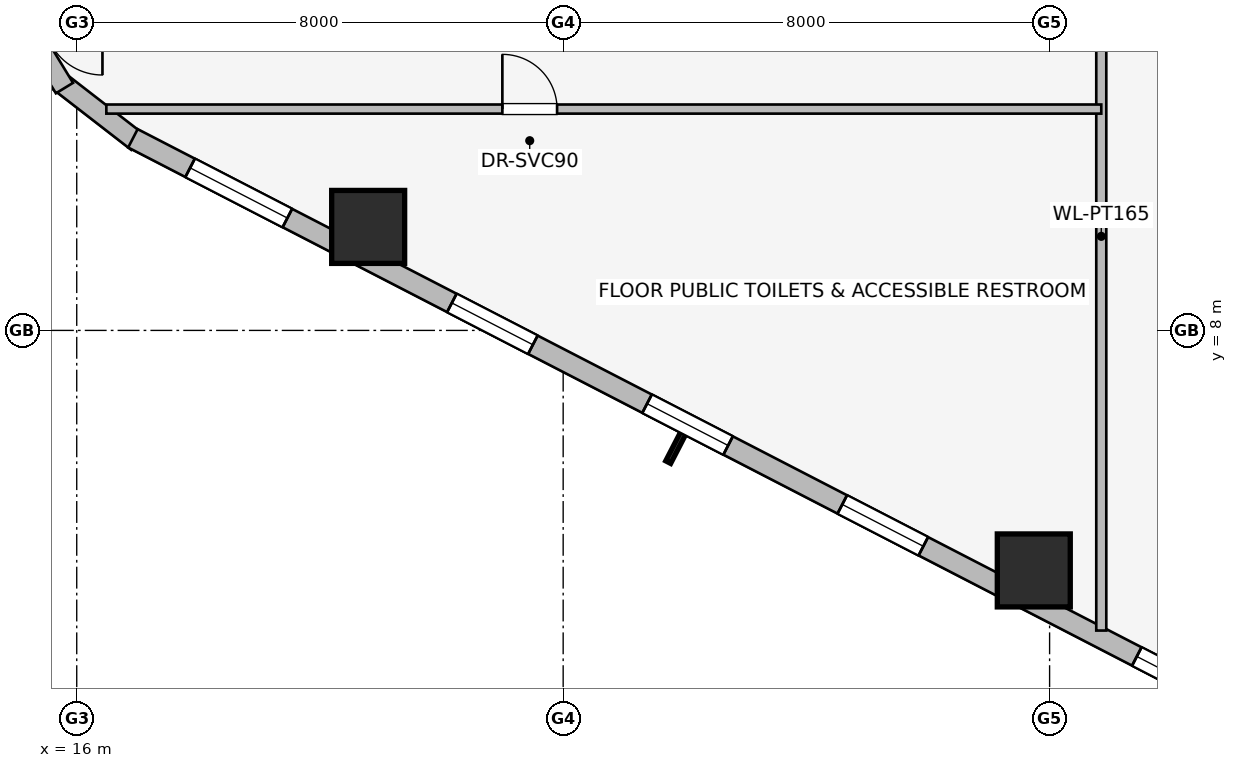
"""IFC4 building model, lengths in metres.
Left out: names, types, materials, properties, quantities, classifications, styles, units other than length and angle.
Written with IfcOpenShell. Run it as: python <this file> out.ifc"""

import sys

from ifc_helpers import new_model, si_unit, direction, frame, frame_2d, origin, origin_2d, place, context, subcontext, project, spatial, rectangle, extrude, element, fill, save


model = new_model("IFC4")
c1 = context("Model", 3, precision=1e-05, world=origin(), true_north=direction((0.0, 1.0)))
c2 = subcontext(c1, "Body", "Model", "MODEL_VIEW")
j1 = project(units=[si_unit("LENGTHUNIT", "METRE"), si_unit("PLANEANGLEUNIT", "RADIAN")], contexts=[c1])
p1 = place(None, origin())
s1 = spatial("IfcSite", under=j1, at=p1, CompositionType="ELEMENT")
p2 = place(p1, origin())
s2 = spatial("IfcBuilding", under=s1, at=p2, CompositionType="ELEMENT")
p3 = place(p2, frame((0.0, 0.0, 59.85)))
s3 = spatial("IfcBuildingStorey", under=s2, at=p3, CompositionType="ELEMENT", Elevation=59.85)
for number, where, z_axis, x_axis in (
    (1, (20.793, 9.702, 0.0), (0.0, 0.0, 1.0), (1.0, 0.0, 0.0)),
    (2, (31.74, 4.053, 0.0), (0.0, 0.0, 1.0), (1.0, 0.0, 0.0)),
):
    element("IfcColumn", number, at=place(p3, frame(where, z_axis=z_axis, x_axis=x_axis)), inside=s3, PredefinedType="COLUMN", context=c2, shape_type="SweptSolid", body=[
        extrude(rectangle(XDim=1.2, YDim=1.2, at=origin_2d()), origin(), (0.0, 0.0, 1.0), 3.65),
    ])
p4 = place(p3, frame((16.998, 11.099, 0.0), z_axis=(0.0, 0.0, 1.0), x_axis=(-0.790691856293, 0.61221433207, 0.0)))
e3 = element("IfcWall", 3, at=p4, inside=s3, PredefinedType="STANDARD", context=c2, shape_type="SweptSolid", body=[
    extrude(rectangle(XDim=1.676, YDim=0.33, at=frame_2d((0.838, 0.0))), origin(), (0.0, 0.0, 1.0), 3.39),
])
p5 = place(p3, frame((15.798, 11.985, 0.0), z_axis=(0.0, 0.0, 1.0), x_axis=(-0.520584129191, 0.853810379671, 0.0)))
e4 = element("IfcWall", 4, at=p5, inside=s3, PredefinedType="STANDARD", context=c2, shape_type="SweptSolid", body=[
    extrude(rectangle(XDim=1.677, YDim=0.33, at=frame_2d((0.838, 0.0))), origin(), (0.0, 0.0, 1.0), 3.39),
])
p6 = place(p3, frame((35.169, 1.743, 0.0), z_axis=(0.0, 0.0, 1.0), x_axis=(-0.888634413993, 0.458616264721, 0.0)))
e5 = element("IfcWall", 5, at=p6, inside=s3, PredefinedType="STANDARD", context=c2, shape_type="SweptSolid", body=[
    extrude(rectangle(XDim=20.531, YDim=0.34, at=frame_2d((10.266, 0.0))), origin(), (0.0, 0.0, 1.0), 2.684),
])
p7 = place(p6, frame((0.902, 0.0, 0.75)))
e6 = element("IfcOpeningElement", 6, at=p7, cuts=e5, PredefinedType="OPENING", context=c2, shape_type="SweptSolid", body=[
    extrude(rectangle(XDim=1.05, YDim=1.4, at=frame_2d((0.525, 0.7))), frame((0.0, 0.18, 0.0), z_axis=(0.0, -1.0, 0.0), x_axis=(1.0, 0.0, 0.0)), (0.0, 0.0, 1.0), 0.36),
])
p8 = place(p6, frame((5.903, 0.0, 0.75)))
e7 = element("IfcOpeningElement", 7, at=p8, cuts=e5, PredefinedType="OPENING", context=c2, shape_type="SweptSolid", body=[
    extrude(rectangle(XDim=1.5, YDim=1.5, at=frame_2d((0.75, 0.75))), frame((0.0, 0.18, 0.0), z_axis=(0.0, -1.0, 0.0), x_axis=(1.0, 0.0, 0.0)), (0.0, 0.0, 1.0), 0.36),
])
p9 = place(p6, frame((9.516, 0.0, 0.75)))
e8 = element("IfcOpeningElement", 8, at=p9, cuts=e5, PredefinedType="OPENING", context=c2, shape_type="SweptSolid", body=[
    extrude(rectangle(XDim=1.5, YDim=1.5, at=frame_2d((0.75, 0.75))), frame((0.0, 0.18, 0.0), z_axis=(0.0, -1.0, 0.0), x_axis=(1.0, 0.0, 0.0)), (0.0, 0.0, 1.0), 0.36),
])
p10 = place(p6, frame((13.129, 0.0, 0.75)))
e9 = element("IfcOpeningElement", 9, at=p10, cuts=e5, PredefinedType="OPENING", context=c2, shape_type="SweptSolid", body=[
    extrude(rectangle(XDim=1.5, YDim=1.5, at=frame_2d((0.75, 0.75))), frame((0.0, 0.18, 0.0), z_axis=(0.0, -1.0, 0.0), x_axis=(1.0, 0.0, 0.0)), (0.0, 0.0, 1.0), 0.36),
])
p11 = place(p6, frame((17.673, 0.0, 0.75)))
e10 = element("IfcOpeningElement", 10, at=p11, cuts=e5, PredefinedType="OPENING", context=c2, shape_type="SweptSolid", body=[
    extrude(rectangle(XDim=1.8, YDim=1.5, at=frame_2d((0.9, 0.75))), frame((0.0, 0.18, 0.0), z_axis=(0.0, -1.0, 0.0), x_axis=(1.0, 0.0, 0.0)), (0.0, 0.0, 1.0), 0.36),
])
p12 = place(p3, frame((32.85, 3.064, 0.0), z_axis=(0.0, 0.0, 1.0), x_axis=(0.0, 1.0, 0.0)))
e11 = element("IfcWall", 11, at=p12, inside=s3, PredefinedType="PARTITIONING", context=c2, shape_type="SweptSolid", body=[
    extrude(rectangle(XDim=12.966, YDim=0.165, at=frame_2d((6.483, 0.0))), origin(), (0.0, 0.0, 1.0), 3.39),
])
p13 = place(p3, frame((16.487, 11.64, 0.0), z_axis=(0.0, 0.0, 1.0), x_axis=(1.0, 0.0, 0.0)))
e12 = element("IfcWall", 12, at=p13, inside=s3, PredefinedType="PARTITIONING", context=c2, shape_type="SweptSolid", body=[
    extrude(rectangle(XDim=16.363, YDim=0.15, at=frame_2d((8.182, 0.0))), origin(), (0.0, 0.0, 1.0), 3.39),
])
p14 = place(p13, frame((6.513, 0.0, 0.0)))
e13 = element("IfcOpeningElement", 13, at=p14, cuts=e12, PredefinedType="OPENING", context=c2, shape_type="SweptSolid", body=[
    extrude(rectangle(XDim=0.9, YDim=2.0, at=frame_2d((0.45, 1.0))), frame((0.0, 0.085, 0.0), z_axis=(0.0, -1.0, 0.0), x_axis=(1.0, 0.0, 0.0)), (0.0, 0.0, 1.0), 0.17),
])
p15 = place(p7, origin())
e14 = element("IfcWindow", 14, at=p15, inside=s3, PartitioningType="SINGLE_PANEL", PredefinedType="WINDOW", context=c2, shape_type="SweptSolid", body=[
    extrude(rectangle(XDim=1.05, YDim=1.4, at=frame_2d((0.525, 0.7))), frame((0.0, 0.03, 0.0), z_axis=(0.0, -1.0, 0.0), x_axis=(1.0, 0.0, 0.0)), (0.0, 0.0, 1.0), 0.06),
])
fill(e6, e14)
p16 = place(p8, origin())
e15 = element("IfcWindow", 15, at=p16, inside=s3, PartitioningType="SINGLE_PANEL", PredefinedType="WINDOW", context=c2, shape_type="SweptSolid", body=[
    extrude(rectangle(XDim=1.5, YDim=1.5, at=frame_2d((0.75, 0.75))), frame((0.0, 0.03, 0.0), z_axis=(0.0, -1.0, 0.0), x_axis=(1.0, 0.0, 0.0)), (0.0, 0.0, 1.0), 0.06),
])
fill(e7, e15)
p17 = place(p9, origin())
e16 = element("IfcWindow", 16, at=p17, inside=s3, PartitioningType="SINGLE_PANEL", PredefinedType="WINDOW", context=c2, shape_type="SweptSolid", body=[
    extrude(rectangle(XDim=1.5, YDim=1.5, at=frame_2d((0.75, 0.75))), frame((0.0, 0.03, 0.0), z_axis=(0.0, -1.0, 0.0), x_axis=(1.0, 0.0, 0.0)), (0.0, 0.0, 1.0), 0.06),
])
fill(e8, e16)
p18 = place(p10, origin())
e17 = element("IfcWindow", 17, at=p18, inside=s3, PartitioningType="SINGLE_PANEL", PredefinedType="WINDOW", context=c2, shape_type="SweptSolid", body=[
    extrude(rectangle(XDim=1.5, YDim=1.5, at=frame_2d((0.75, 0.75))), frame((0.0, 0.03, 0.0), z_axis=(0.0, -1.0, 0.0), x_axis=(1.0, 0.0, 0.0)), (0.0, 0.0, 1.0), 0.06),
])
fill(e9, e17)
p19 = place(p11, origin())
e18 = element("IfcWindow", 18, at=p19, inside=s3, PartitioningType="SINGLE_PANEL", PredefinedType="WINDOW", context=c2, shape_type="SweptSolid", body=[
    extrude(rectangle(XDim=1.8, YDim=1.5, at=frame_2d((0.9, 0.75))), frame((0.0, 0.03, 0.0), z_axis=(0.0, -1.0, 0.0), x_axis=(1.0, 0.0, 0.0)), (0.0, 0.0, 1.0), 0.06),
])
fill(e10, e18)
p20 = place(p14, origin())
e19 = element("IfcDoor", 19, at=p20, inside=s3, OperationType="SINGLE_SWING_LEFT", PredefinedType="DOOR", context=c2, shape_type="SweptSolid", body=[
    extrude(rectangle(XDim=0.9, YDim=2.0, at=frame_2d((0.45, 1.0))), frame((0.0, 0.025, 0.0), z_axis=(0.0, -1.0, 0.0), x_axis=(1.0, 0.0, 0.0)), (0.0, 0.0, 1.0), 0.05),
])
fill(e13, e19)
save(model, sys.argv[1])
